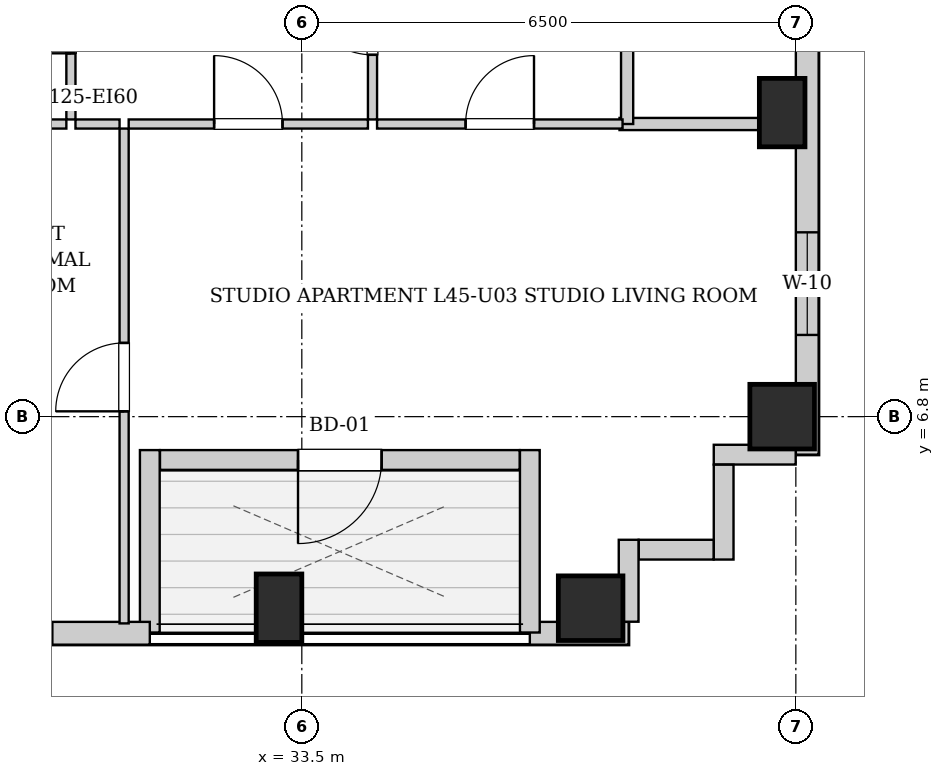
"""IFC4 building model, lengths in metres.
Left out: names, types, materials, properties, quantities, classifications, styles, units other than length and angle.
Written with IfcOpenShell. Run it as: python <this file> out.ifc"""

import sys

from ifc_helpers import new_model, si_unit, direction, frame, frame_2d, origin, origin_2d, place, context, subcontext, project, spatial, rectangle, extrude, element, fill, save


model = new_model("IFC4")
c1 = context("Model", 3, precision=1e-05, world=origin(), true_north=direction((0.0, 1.0)))
c2 = subcontext(c1, "Body", "Model", "MODEL_VIEW")
j1 = project(units=[si_unit("LENGTHUNIT", "METRE"), si_unit("PLANEANGLEUNIT", "RADIAN")], contexts=[c1])
p1 = place(None, origin())
s1 = spatial("IfcSite", under=j1, at=p1, CompositionType="ELEMENT")
p2 = place(p1, origin())
s2 = spatial("IfcBuilding", under=s1, at=p2, CompositionType="ELEMENT")
p3 = place(p2, frame((0.0, 0.0, 156.9)))
s3 = spatial("IfcBuildingStorey", under=s2, at=p3, CompositionType="ELEMENT", Elevation=156.9)
p4 = place(p3, frame((33.2, 4.28, 0.0), z_axis=(0.0, 0.0, 1.0), x_axis=(1.0, 0.0, 0.0)))
e1 = element("IfcColumn", 1, at=p4, inside=s3, PredefinedType="COLUMN", context=c2, shape_type="SweptSolid", body=[
    extrude(rectangle(XDim=0.6, YDim=0.9, at=origin_2d()), origin(), (0.0, 0.0, 1.0), 3.25),
])
for number, where, z_axis, x_axis in (
    (2, (37.3, 4.28, 0.0), (0.0, 0.0, 1.0), (1.0, 0.0, 0.0)),
    (3, (39.82, 6.8, 0.0), (0.0, 0.0, 1.0), (1.0, 0.0, 0.0)),
):
    element("IfcColumn", number, at=place(p3, frame(where, z_axis=z_axis, x_axis=x_axis)), inside=s3, PredefinedType="COLUMN", context=c2, shape_type="SweptSolid", body=[
        extrude(rectangle(XDim=0.85, YDim=0.85, at=origin_2d()), origin(), (0.0, 0.0, 1.0), 3.25),
    ])
p5 = place(p3, frame((39.82, 10.8, 0.0), z_axis=(0.0, 0.0, 1.0), x_axis=(1.0, 0.0, 0.0)))
e4 = element("IfcColumn", 4, at=p5, inside=s3, PredefinedType="COLUMN", context=c2, shape_type="SweptSolid", body=[
    extrude(rectangle(XDim=0.6, YDim=0.9, at=origin_2d()), origin(), (0.0, 0.0, 1.0), 3.25),
])
p6 = place(p3, frame((40.15, 40.8, 0.0), z_axis=(0.0, 0.0, 1.0), x_axis=(0.0, -1.0, 0.0)))
e5 = element("IfcWall", 5, at=p6, inside=s3, PredefinedType="SOLIDWALL", context=c2, shape_type="SweptSolid", body=[
    extrude(rectangle(XDim=34.5, YDim=0.3, at=frame_2d((17.25, 0.0))), origin(), (0.0, 0.0, 1.0), 2.99),
])
p7 = place(p6, frame((31.575, 0.0, 0.55)))
e6 = element("IfcOpeningElement", 6, at=p7, cuts=e5, PredefinedType="OPENING", context=c2, shape_type="SweptSolid", body=[
    extrude(rectangle(XDim=1.35, YDim=1.2, at=frame_2d((0.675, 0.6))), frame((0.0, 0.16, 0.0), z_axis=(0.0, -1.0, 0.0), x_axis=(1.0, 0.0, 0.0)), (0.0, 0.0, 1.0), 0.32),
])
p8 = place(p6, frame((3.075, 0.0, 0.55)))
e7 = element("IfcOpeningElement", 7, at=p8, cuts=e5, PredefinedType="OPENING", context=c2, shape_type="SweptSolid", body=[
    extrude(rectangle(XDim=1.35, YDim=1.2, at=frame_2d((0.675, 0.6))), frame((0.0, 0.16, 0.0), z_axis=(0.0, -1.0, 0.0), x_axis=(1.0, 0.0, 0.0)), (0.0, 0.0, 1.0), 0.32),
])
p9 = place(p6, frame((1.085, 0.0, 0.55)))
e8 = element("IfcOpeningElement", 8, at=p9, cuts=e5, PredefinedType="OPENING", context=c2, shape_type="SweptSolid", body=[
    extrude(rectangle(XDim=1.35, YDim=1.2, at=frame_2d((0.675, 0.6))), frame((0.0, 0.16, 0.0), z_axis=(0.0, -1.0, 0.0), x_axis=(1.0, 0.0, 0.0)), (0.0, 0.0, 1.0), 0.32),
])
p10 = place(p6, frame((22.8, 0.0, 0.55)))
e9 = element("IfcOpeningElement", 9, at=p10, cuts=e5, PredefinedType="OPENING", context=c2, shape_type="SweptSolid", body=[
    extrude(rectangle(XDim=1.35, YDim=1.2, at=frame_2d((0.675, 0.6))), frame((0.0, 0.16, 0.0), z_axis=(0.0, -1.0, 0.0), x_axis=(1.0, 0.0, 0.0)), (0.0, 0.0, 1.0), 0.32),
])
p11 = place(p6, frame((13.425, 0.0, 0.55)))
e10 = element("IfcOpeningElement", 10, at=p11, cuts=e5, PredefinedType="OPENING", context=c2, shape_type="SweptSolid", body=[
    extrude(rectangle(XDim=1.35, YDim=1.2, at=frame_2d((0.675, 0.6))), frame((0.0, 0.16, 0.0), z_axis=(0.0, -1.0, 0.0), x_axis=(1.0, 0.0, 0.0)), (0.0, 0.0, 1.0), 0.32),
])
p12 = place(p3, frame((37.8, 3.95, 0.0), z_axis=(0.0, 0.0, 1.0), x_axis=(-1.0, 0.0, 0.0)))
e11 = element("IfcWall", 11, at=p12, inside=s3, PredefinedType="SOLIDWALL", context=c2, shape_type="SweptSolid", body=[
    extrude(rectangle(XDim=1.3, YDim=0.3, at=frame_2d((0.65, 0.0))), origin(), (0.0, 0.0, 1.0), 2.99),
])
p13 = place(p3, frame((36.5, 3.96, 0.0), z_axis=(0.0, 0.0, 1.0), x_axis=(0.0, 1.0, 0.0)))
e12 = element("IfcWall", 12, at=p13, inside=s3, PredefinedType="SOLIDWALL", context=c2, shape_type="SweptSolid", body=[
    extrude(rectangle(XDim=2.4, YDim=0.26, at=frame_2d((1.2, 0.0))), origin(), (0.0, 0.0, 1.0), 2.99),
])
p14 = place(p3, frame((36.366, 6.23, 0.0), z_axis=(0.0, 0.0, 1.0), x_axis=(-1.0, 0.0, 0.0)))
e13 = element("IfcWall", 13, at=p14, inside=s3, PredefinedType="SOLIDWALL", context=c2, shape_type="SweptSolid", body=[
    extrude(rectangle(XDim=4.732, YDim=0.26, at=frame_2d((2.366, 0.0))), origin(), (0.0, 0.0, 1.0), 2.99),
])
p15 = place(p14, frame((1.816, 0.0, 0.0)))
e14 = element("IfcOpeningElement", 14, at=p15, cuts=e13, PredefinedType="OPENING", context=c2, shape_type="SweptSolid", body=[
    extrude(rectangle(XDim=1.1, YDim=2.0, at=frame_2d((0.55, 1.0))), frame((0.0, 0.14, 0.0), z_axis=(0.0, -1.0, 0.0), x_axis=(1.0, 0.0, 0.0)), (0.0, 0.0, 1.0), 0.28),
])
p16 = place(p3, frame((31.5, 6.36, 0.0), z_axis=(0.0, 0.0, 1.0), x_axis=(0.0, -1.0, 0.0)))
e15 = element("IfcWall", 15, at=p16, inside=s3, PredefinedType="SOLIDWALL", context=c2, shape_type="SweptSolid", body=[
    extrude(rectangle(XDim=2.4, YDim=0.26, at=frame_2d((1.2, 0.0))), origin(), (0.0, 0.0, 1.0), 2.99),
])
p17 = place(p3, frame((31.5, 3.95, 0.0), z_axis=(0.0, 0.0, 1.0), x_axis=(-1.0, 0.0, 0.0)))
e16 = element("IfcWall", 16, at=p17, inside=s3, PredefinedType="SOLIDWALL", context=c2, shape_type="SweptSolid", body=[
    extrude(rectangle(XDim=15.05, YDim=0.3, at=frame_2d((7.525, 0.0))), origin(), (0.0, 0.0, 1.0), 2.99),
])
p18 = place(p17, frame((10.989, 0.0, 0.55)))
e17 = element("IfcOpeningElement", 17, at=p18, cuts=e16, PredefinedType="OPENING", context=c2, shape_type="SweptSolid", body=[
    extrude(rectangle(XDim=1.35, YDim=1.2, at=frame_2d((0.675, 0.6))), frame((0.0, 0.16, 0.0), z_axis=(0.0, -1.0, 0.0), x_axis=(1.0, 0.0, 0.0)), (0.0, 0.0, 1.0), 0.32),
])
p19 = place(p17, frame((1.282, 0.0, 0.55)))
e18 = element("IfcOpeningElement", 18, at=p19, cuts=e16, PredefinedType="OPENING", context=c2, shape_type="SweptSolid", body=[
    extrude(rectangle(XDim=1.35, YDim=1.2, at=frame_2d((0.675, 0.6))), frame((0.0, 0.16, 0.0), z_axis=(0.0, -1.0, 0.0), x_axis=(1.0, 0.0, 0.0)), (0.0, 0.0, 1.0), 0.32),
])
p20 = place(p3, frame((39.998, 6.3, 0.0), z_axis=(0.0, 0.0, 1.0), x_axis=(-1.0, 0.0, 0.0)))
e19 = element("IfcWall", 19, at=p20, inside=s3, PredefinedType="SOLIDWALL", context=c2, shape_type="SweptSolid", body=[
    extrude(rectangle(XDim=1.078, YDim=0.26, at=frame_2d((0.539, 0.0))), origin(), (0.0, 0.0, 1.0), 2.99),
])
p21 = place(p3, frame((39.05, 6.168, 0.0), z_axis=(0.0, 0.0, 1.0), x_axis=(0.0, -1.0, 0.0)))
e20 = element("IfcWall", 20, at=p21, inside=s3, PredefinedType="SOLIDWALL", context=c2, shape_type="SweptSolid", body=[
    extrude(rectangle(XDim=1.248, YDim=0.26, at=frame_2d((0.624, 0.0))), origin(), (0.0, 0.0, 1.0), 2.99),
])
p22 = place(p3, frame((38.918, 5.05, 0.0), z_axis=(0.0, 0.0, 1.0), x_axis=(-1.0, 0.0, 0.0)))
e21 = element("IfcWall", 21, at=p22, inside=s3, PredefinedType="SOLIDWALL", context=c2, shape_type="SweptSolid", body=[
    extrude(rectangle(XDim=0.986, YDim=0.26, at=frame_2d((0.493, 0.0))), origin(), (0.0, 0.0, 1.0), 2.99),
])
p23 = place(p3, frame((37.8, 5.18, 0.0), z_axis=(0.0, 0.0, 1.0), x_axis=(0.0, -1.0, 0.0)))
e22 = element("IfcWall", 22, at=p23, inside=s3, PredefinedType="SOLIDWALL", context=c2, shape_type="SweptSolid", body=[
    extrude(rectangle(XDim=1.078, YDim=0.26, at=frame_2d((0.539, 0.0))), origin(), (0.0, 0.0, 1.0), 2.99),
])
p24 = place(p3, frame((37.68, 10.65, 0.0), z_axis=(0.0, 0.0, 1.0), x_axis=(1.0, 0.0, 0.0)))
e23 = element("IfcWall", 23, at=p24, inside=s3, PredefinedType="PARTITIONING", context=c2, shape_type="SweptSolid", body=[
    extrude(rectangle(XDim=2.34, YDim=0.16, at=frame_2d((1.17, 0.0))), origin(), (0.0, 0.0, 1.0), 2.99),
])
p25 = place(p3, frame((37.78, 10.65, 0.0), z_axis=(0.0, 0.0, 1.0), x_axis=(0.0, 1.0, 0.0)))
e24 = element("IfcWall", 24, at=p25, inside=s3, PredefinedType="PARTITIONING", context=c2, shape_type="SweptSolid", body=[
    extrude(rectangle(XDim=2.66, YDim=0.16, at=frame_2d((1.33, 0.0))), origin(), (0.0, 0.0, 1.0), 2.99),
])
p26 = place(p3, frame((30.462, 10.71, 0.0), z_axis=(0.0, 0.0, 1.0), x_axis=(0.0, 1.0, 0.0)))
e25 = element("IfcWall", 25, at=p26, inside=s3, PredefinedType="PARTITIONING", context=c2, shape_type="SweptSolid", body=[
    extrude(rectangle(XDim=2.6, YDim=0.12, at=frame_2d((1.3, 0.0))), origin(), (0.0, 0.0, 1.0), 2.99),
])
p27 = place(p26, frame((0.87, 0.0, 0.0)))
e26 = element("IfcOpeningElement", 26, at=p27, cuts=e25, PredefinedType="OPENING", context=c2, shape_type="SweptSolid", body=[
    extrude(rectangle(XDim=0.86, YDim=2.05, at=frame_2d((0.43, 1.025))), frame((0.0, 0.07, 0.0), z_axis=(0.0, -1.0, 0.0), x_axis=(1.0, 0.0, 0.0)), (0.0, 0.0, 1.0), 0.14),
])
p28 = place(p3, frame((28.002, 10.65, 0.0), z_axis=(0.0, 0.0, 1.0), x_axis=(1.0, 0.0, 0.0)))
e27 = element("IfcWall", 27, at=p28, inside=s3, PredefinedType="PARTITIONING", context=c2, shape_type="SweptSolid", body=[
    extrude(rectangle(XDim=2.4, YDim=0.12, at=frame_2d((1.2, 0.0))), origin(), (0.0, 0.0, 1.0), 2.99),
])
p29 = place(p3, frame((34.43, 10.71, 0.0), z_axis=(0.0, 0.0, 1.0), x_axis=(0.0, 1.0, 0.0)))
e28 = element("IfcWall", 28, at=p29, inside=s3, PredefinedType="PARTITIONING", context=c2, shape_type="SweptSolid", body=[
    extrude(rectangle(XDim=2.6, YDim=0.12, at=frame_2d((1.3, 0.0))), origin(), (0.0, 0.0, 1.0), 2.99),
])
p30 = place(p29, frame((0.85, 0.0, 0.0)))
e29 = element("IfcOpeningElement", 29, at=p30, cuts=e28, PredefinedType="OPENING", context=c2, shape_type="SweptSolid", body=[
    extrude(rectangle(XDim=0.9, YDim=2.05, at=frame_2d((0.45, 1.025))), frame((0.0, 0.07, 0.0), z_axis=(0.0, -1.0, 0.0), x_axis=(1.0, 0.0, 0.0)), (0.0, 0.0, 1.0), 0.14),
])
p31 = place(p3, frame((30.522, 10.65, 0.0), z_axis=(0.0, 0.0, 1.0), x_axis=(1.0, 0.0, 0.0)))
e30 = element("IfcWall", 30, at=p31, inside=s3, PredefinedType="PARTITIONING", context=c2, shape_type="SweptSolid", body=[
    extrude(rectangle(XDim=0.58, YDim=0.12, at=frame_2d((0.29, 0.0))), origin(), (0.0, 0.0, 1.0), 2.99),
])
p32 = place(p3, frame((31.222, 10.65, 0.0), z_axis=(0.0, 0.0, 1.0), x_axis=(1.0, 0.0, 0.0)))
e31 = element("IfcWall", 31, at=p32, inside=s3, PredefinedType="PARTITIONING", context=c2, shape_type="SweptSolid", body=[
    extrude(rectangle(XDim=3.148, YDim=0.12, at=frame_2d((1.574, 0.0))), origin(), (0.0, 0.0, 1.0), 2.99),
])
p33 = place(p32, frame((1.124, 0.0, 0.0)))
e32 = element("IfcOpeningElement", 32, at=p33, cuts=e31, PredefinedType="OPENING", context=c2, shape_type="SweptSolid", body=[
    extrude(rectangle(XDim=0.9, YDim=2.05, at=frame_2d((0.45, 1.025))), frame((0.0, 0.07, 0.0), z_axis=(0.0, -1.0, 0.0), x_axis=(1.0, 0.0, 0.0)), (0.0, 0.0, 1.0), 0.14),
])
p34 = place(p3, frame((34.49, 10.65, 0.0), z_axis=(0.0, 0.0, 1.0), x_axis=(1.0, 0.0, 0.0)))
e33 = element("IfcWall", 33, at=p34, inside=s3, PredefinedType="PARTITIONING", context=c2, shape_type="SweptSolid", body=[
    extrude(rectangle(XDim=3.23, YDim=0.12, at=frame_2d((1.615, 0.0))), origin(), (0.0, 0.0, 1.0), 2.99),
])
p35 = place(p34, frame((1.165, 0.0, 0.0)))
e34 = element("IfcOpeningElement", 34, at=p35, cuts=e33, PredefinedType="OPENING", context=c2, shape_type="SweptSolid", body=[
    extrude(rectangle(XDim=0.9, YDim=2.05, at=frame_2d((0.45, 1.025))), frame((0.0, 0.07, 0.0), z_axis=(0.0, -1.0, 0.0), x_axis=(1.0, 0.0, 0.0)), (0.0, 0.0, 1.0), 0.14),
])
p36 = place(p3, frame((31.162, 4.08, 0.0), z_axis=(0.0, 0.0, 1.0), x_axis=(0.0, 1.0, 0.0)))
e35 = element("IfcWall", 35, at=p36, inside=s3, PredefinedType="PARTITIONING", context=c2, shape_type="SweptSolid", body=[
    extrude(rectangle(XDim=6.51, YDim=0.12, at=frame_2d((3.255, 0.0))), origin(), (0.0, 0.0, 1.0), 2.99),
])
p37 = place(p36, frame((2.79, 0.0, 0.0)))
e36 = element("IfcOpeningElement", 36, at=p37, cuts=e35, PredefinedType="OPENING", context=c2, shape_type="SweptSolid", body=[
    extrude(rectangle(XDim=0.9, YDim=2.05, at=frame_2d((0.45, 1.025))), frame((0.0, 0.07, 0.0), z_axis=(0.0, -1.0, 0.0), x_axis=(1.0, 0.0, 0.0)), (0.0, 0.0, 1.0), 0.14),
])
p38 = place(p27, origin())
e37 = element("IfcDoor", 37, at=p38, inside=s3, OperationType="SINGLE_SWING_LEFT", PredefinedType="DOOR", context=c2, shape_type="SweptSolid", body=[
    extrude(rectangle(XDim=0.86, YDim=2.05, at=frame_2d((0.43, 1.025))), frame((0.0, 0.025, 0.0), z_axis=(0.0, -1.0, 0.0), x_axis=(1.0, 0.0, 0.0)), (0.0, 0.0, 1.0), 0.05),
])
fill(e26, e37)
p39 = place(p30, origin())
e38 = element("IfcDoor", 38, at=p39, inside=s3, OperationType="SINGLE_SWING_RIGHT", PredefinedType="DOOR", context=c2, shape_type="SweptSolid", body=[
    extrude(rectangle(XDim=0.9, YDim=2.05, at=frame_2d((0.45, 1.025))), frame((0.0, 0.025, 0.0), z_axis=(0.0, -1.0, 0.0), x_axis=(1.0, 0.0, 0.0)), (0.0, 0.0, 1.0), 0.05),
])
fill(e29, e38)
p40 = place(p33, origin())
e39 = element("IfcDoor", 39, at=p40, inside=s3, OperationType="SINGLE_SWING_LEFT", PredefinedType="DOOR", context=c2, shape_type="SweptSolid", body=[
    extrude(rectangle(XDim=0.9, YDim=2.05, at=frame_2d((0.45, 1.025))), frame((0.0, 0.025, 0.0), z_axis=(0.0, -1.0, 0.0), x_axis=(1.0, 0.0, 0.0)), (0.0, 0.0, 1.0), 0.05),
])
fill(e32, e39)
p41 = place(p35, origin())
e40 = element("IfcDoor", 40, at=p41, inside=s3, OperationType="SINGLE_SWING_RIGHT", PredefinedType="DOOR", context=c2, shape_type="SweptSolid", body=[
    extrude(rectangle(XDim=0.9, YDim=2.05, at=frame_2d((0.45, 1.025))), frame((0.0, 0.025, 0.0), z_axis=(0.0, -1.0, 0.0), x_axis=(1.0, 0.0, 0.0)), (0.0, 0.0, 1.0), 0.05),
])
fill(e34, e40)
p42 = place(p37, origin())
e41 = element("IfcDoor", 41, at=p42, inside=s3, OperationType="SINGLE_SWING_LEFT", PredefinedType="DOOR", context=c2, shape_type="SweptSolid", body=[
    extrude(rectangle(XDim=0.9, YDim=2.05, at=frame_2d((0.45, 1.025))), frame((0.0, 0.025, 0.0), z_axis=(0.0, -1.0, 0.0), x_axis=(1.0, 0.0, 0.0)), (0.0, 0.0, 1.0), 0.05),
])
fill(e36, e41)
p43 = place(p15, origin())
e42 = element("IfcDoor", 42, at=p43, inside=s3, OperationType="SINGLE_SWING_RIGHT", PredefinedType="DOOR", context=c2, shape_type="SweptSolid", body=[
    extrude(rectangle(XDim=1.1, YDim=2.0, at=frame_2d((0.55, 1.0))), frame((0.0, 0.025, 0.0), z_axis=(0.0, -1.0, 0.0), x_axis=(1.0, 0.0, 0.0)), (0.0, 0.0, 1.0), 0.05),
])
fill(e14, e42)
p44 = place(p7, origin())
e43 = element("IfcWindow", 43, at=p44, inside=s3, PartitioningType="SINGLE_PANEL", PredefinedType="WINDOW", context=c2, shape_type="SweptSolid", body=[
    extrude(rectangle(XDim=1.35, YDim=1.2, at=frame_2d((0.675, 0.6))), frame((0.0, 0.03, 0.0), z_axis=(0.0, -1.0, 0.0), x_axis=(1.0, 0.0, 0.0)), (0.0, 0.0, 1.0), 0.06),
])
fill(e6, e43)
save(model, sys.argv[1])
